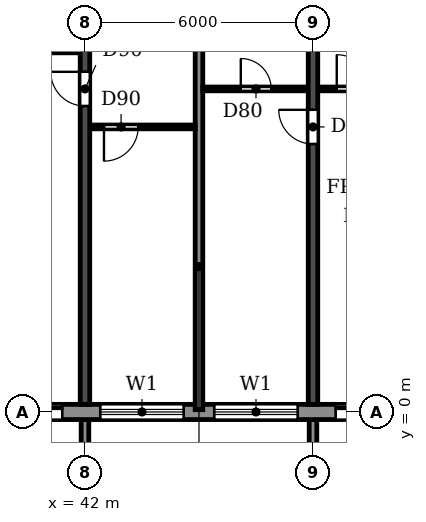
"""IFC4 building model, lengths in metres.
Left out: names, types, materials, properties, quantities, classifications, styles, units other than length and angle.
Written with IfcOpenShell. Run it as: python <this file> out.ifc"""

import sys

from ifc_helpers import new_model, si_unit, direction, frame, frame_2d, origin, place, context, subcontext, project, spatial, polyline, rectangle, outline, extrude, source, transform, mapped, element, fill, save


model = new_model("IFC4")
c1 = context("Model", 3, precision=1e-05, world=origin(), true_north=direction((0.0, 1.0)))
c2 = subcontext(c1, "Body", "Model", "MODEL_VIEW")
j1 = project(units=[si_unit("LENGTHUNIT", "METRE"), si_unit("PLANEANGLEUNIT", "RADIAN")], contexts=[c1])
p1 = place(None, origin())
s1 = spatial("IfcSite", under=j1, at=p1, CompositionType="ELEMENT")
p2 = place(p1, origin())
s2 = spatial("IfcBuilding", under=s1, at=p2, CompositionType="ELEMENT")
p3 = place(p2, frame((0.0, 0.0, 171.9)))
s3 = spatial("IfcBuildingStorey", under=s2, at=p3, CompositionType="ELEMENT", Elevation=171.9)
p4 = place(p3, frame((42.0, 0.2, 0.0), z_axis=(0.0, 0.0, 1.0), x_axis=(0.0, 1.0, 0.0)))
e1 = element("IfcWall", 1, at=p4, inside=s3, PredefinedType="SHEAR", context=c2, shape_type="SweptSolid", body=[
    extrude(rectangle(XDim=11.7, YDim=0.25, at=frame_2d((5.85, 0.0))), origin(), (0.0, 0.0, 1.0), 3.08),
])
p5 = place(p4, frame((7.85, 0.0, 0.0)))
e2 = element("IfcOpeningElement", 2, at=p5, cuts=e1, PredefinedType="OPENING", context=c2, shape_type="SweptSolid", body=[
    extrude(rectangle(XDim=0.9, YDim=2.1, at=frame_2d((0.45, 1.05))), frame((0.0, 0.135, 0.0), z_axis=(0.0, -1.0, 0.0), x_axis=(1.0, 0.0, 0.0)), (0.0, 0.0, 1.0), 0.27),
])
p6 = place(p3, frame((48.0, 0.2, 0.0), z_axis=(0.0, 0.0, 1.0), x_axis=(0.0, 1.0, 0.0)))
e3 = element("IfcWall", 3, at=p6, inside=s3, PredefinedType="SHEAR", context=c2, shape_type="SweptSolid", body=[
    extrude(rectangle(XDim=11.7, YDim=0.25, at=frame_2d((5.85, 0.0))), origin(), (0.0, 0.0, 1.0), 3.08),
])
p7 = place(p6, frame((6.85, 0.0, 0.0)))
e4 = element("IfcOpeningElement", 4, at=p7, cuts=e3, PredefinedType="OPENING", context=c2, shape_type="SweptSolid", body=[
    extrude(rectangle(XDim=0.9, YDim=2.1, at=frame_2d((0.45, 1.05))), frame((0.0, 0.135, 0.0), z_axis=(0.0, -1.0, 0.0), x_axis=(1.0, 0.0, 0.0)), (0.0, 0.0, 1.0), 0.27),
])
p8 = place(p3, frame((22.683, 0.0, 0.0), z_axis=(0.0, 0.0, 1.0), x_axis=(1.0, 0.0, 0.0)))
e5 = element("IfcWall", 5, at=p8, inside=s3, PredefinedType="STANDARD", context=c2, shape_type="SweptSolid", body=[
    extrude(rectangle(XDim=56.634, YDim=0.4, at=frame_2d((28.317, 0.0))), origin(), (0.0, 0.0, 1.0), 3.08),
])
p9 = place(p8, frame((1.717, 0.0, 0.9)))
e6 = element("IfcOpeningElement", 6, at=p9, cuts=e5, PredefinedType="OPENING", context=c2, shape_type="SweptSolid", body=[
    extrude(rectangle(XDim=2.2, YDim=1.5, at=frame_2d((1.1, 0.75))), frame((0.0, 0.21, 0.0), z_axis=(0.0, -1.0, 0.0), x_axis=(1.0, 0.0, 0.0)), (0.0, 0.0, 1.0), 0.42),
])
p10 = place(p8, frame((4.917, 0.0, 0.0)))
e7 = element("IfcOpeningElement", 7, at=p10, cuts=e5, PredefinedType="OPENING", context=c2, shape_type="SweptSolid", body=[
    extrude(rectangle(XDim=1.8, YDim=2.4, at=frame_2d((0.9, 1.2))), frame((0.0, 0.21, 0.0), z_axis=(0.0, -1.0, 0.0), x_axis=(1.0, 0.0, 0.0)), (0.0, 0.0, 1.0), 0.42),
])
p11 = place(p8, frame((7.717, 0.0, 0.9)))
e8 = element("IfcOpeningElement", 8, at=p11, cuts=e5, PredefinedType="OPENING", context=c2, shape_type="SweptSolid", body=[
    extrude(rectangle(XDim=2.2, YDim=1.5, at=frame_2d((1.1, 0.75))), frame((0.0, 0.21, 0.0), z_axis=(0.0, -1.0, 0.0), x_axis=(1.0, 0.0, 0.0)), (0.0, 0.0, 1.0), 0.42),
])
p12 = place(p8, frame((10.717, 0.0, 0.9)))
e9 = element("IfcOpeningElement", 9, at=p12, cuts=e5, PredefinedType="OPENING", context=c2, shape_type="SweptSolid", body=[
    extrude(rectangle(XDim=2.2, YDim=1.5, at=frame_2d((1.1, 0.75))), frame((0.0, 0.21, 0.0), z_axis=(0.0, -1.0, 0.0), x_axis=(1.0, 0.0, 0.0)), (0.0, 0.0, 1.0), 0.42),
])
p13 = place(p8, frame((13.717, 0.0, 0.9)))
e10 = element("IfcOpeningElement", 10, at=p13, cuts=e5, PredefinedType="OPENING", context=c2, shape_type="SweptSolid", body=[
    extrude(rectangle(XDim=2.2, YDim=1.5, at=frame_2d((1.1, 0.75))), frame((0.0, 0.21, 0.0), z_axis=(0.0, -1.0, 0.0), x_axis=(1.0, 0.0, 0.0)), (0.0, 0.0, 1.0), 0.42),
])
p14 = place(p8, frame((16.917, 0.0, 0.0)))
e11 = element("IfcOpeningElement", 11, at=p14, cuts=e5, PredefinedType="OPENING", context=c2, shape_type="SweptSolid", body=[
    extrude(rectangle(XDim=1.8, YDim=2.4, at=frame_2d((0.9, 1.2))), frame((0.0, 0.21, 0.0), z_axis=(0.0, -1.0, 0.0), x_axis=(1.0, 0.0, 0.0)), (0.0, 0.0, 1.0), 0.42),
])
p15 = place(p8, frame((19.717, 0.0, 0.9)))
e12 = element("IfcOpeningElement", 12, at=p15, cuts=e5, PredefinedType="OPENING", context=c2, shape_type="SweptSolid", body=[
    extrude(rectangle(XDim=2.2, YDim=1.5, at=frame_2d((1.1, 0.75))), frame((0.0, 0.21, 0.0), z_axis=(0.0, -1.0, 0.0), x_axis=(1.0, 0.0, 0.0)), (0.0, 0.0, 1.0), 0.42),
])
p16 = place(p8, frame((22.717, 0.0, 0.9)))
e13 = element("IfcOpeningElement", 13, at=p16, cuts=e5, PredefinedType="OPENING", context=c2, shape_type="SweptSolid", body=[
    extrude(rectangle(XDim=2.2, YDim=1.5, at=frame_2d((1.1, 0.75))), frame((0.0, 0.21, 0.0), z_axis=(0.0, -1.0, 0.0), x_axis=(1.0, 0.0, 0.0)), (0.0, 0.0, 1.0), 0.42),
])
p17 = place(p8, frame((25.917, 0.0, 0.0)))
e14 = element("IfcOpeningElement", 14, at=p17, cuts=e5, PredefinedType="OPENING", context=c2, shape_type="SweptSolid", body=[
    extrude(rectangle(XDim=1.8, YDim=2.4, at=frame_2d((0.9, 1.2))), frame((0.0, 0.21, 0.0), z_axis=(0.0, -1.0, 0.0), x_axis=(1.0, 0.0, 0.0)), (0.0, 0.0, 1.0), 0.42),
])
p18 = place(p8, frame((28.717, 0.0, 0.9)))
e15 = element("IfcOpeningElement", 15, at=p18, cuts=e5, PredefinedType="OPENING", context=c2, shape_type="SweptSolid", body=[
    extrude(rectangle(XDim=2.2, YDim=1.5, at=frame_2d((1.1, 0.75))), frame((0.0, 0.21, 0.0), z_axis=(0.0, -1.0, 0.0), x_axis=(1.0, 0.0, 0.0)), (0.0, 0.0, 1.0), 0.42),
])
p19 = place(p8, frame((31.717, 0.0, 0.9)))
e16 = element("IfcOpeningElement", 16, at=p19, cuts=e5, PredefinedType="OPENING", context=c2, shape_type="SweptSolid", body=[
    extrude(rectangle(XDim=2.2, YDim=1.5, at=frame_2d((1.1, 0.75))), frame((0.0, 0.21, 0.0), z_axis=(0.0, -1.0, 0.0), x_axis=(1.0, 0.0, 0.0)), (0.0, 0.0, 1.0), 0.42),
])
p20 = place(p8, frame((34.717, 0.0, 0.9)))
e17 = element("IfcOpeningElement", 17, at=p20, cuts=e5, PredefinedType="OPENING", context=c2, shape_type="SweptSolid", body=[
    extrude(rectangle(XDim=2.2, YDim=1.5, at=frame_2d((1.1, 0.75))), frame((0.0, 0.21, 0.0), z_axis=(0.0, -1.0, 0.0), x_axis=(1.0, 0.0, 0.0)), (0.0, 0.0, 1.0), 0.42),
])
p21 = place(p8, frame((37.717, 0.0, 0.9)))
e18 = element("IfcOpeningElement", 18, at=p21, cuts=e5, PredefinedType="OPENING", context=c2, shape_type="SweptSolid", body=[
    extrude(rectangle(XDim=2.2, YDim=1.5, at=frame_2d((1.1, 0.75))), frame((0.0, 0.21, 0.0), z_axis=(0.0, -1.0, 0.0), x_axis=(1.0, 0.0, 0.0)), (0.0, 0.0, 1.0), 0.42),
])
p22 = place(p8, frame((40.917, 0.0, 0.0)))
e19 = element("IfcOpeningElement", 19, at=p22, cuts=e5, PredefinedType="OPENING", context=c2, shape_type="SweptSolid", body=[
    extrude(rectangle(XDim=1.8, YDim=2.4, at=frame_2d((0.9, 1.2))), frame((0.0, 0.21, 0.0), z_axis=(0.0, -1.0, 0.0), x_axis=(1.0, 0.0, 0.0)), (0.0, 0.0, 1.0), 0.42),
])
p23 = place(p8, frame((43.717, 0.0, 0.9)))
e20 = element("IfcOpeningElement", 20, at=p23, cuts=e5, PredefinedType="OPENING", context=c2, shape_type="SweptSolid", body=[
    extrude(rectangle(XDim=2.2, YDim=1.5, at=frame_2d((1.1, 0.75))), frame((0.0, 0.21, 0.0), z_axis=(0.0, -1.0, 0.0), x_axis=(1.0, 0.0, 0.0)), (0.0, 0.0, 1.0), 0.42),
])
p24 = place(p8, frame((46.717, 0.0, 0.9)))
e21 = element("IfcOpeningElement", 21, at=p24, cuts=e5, PredefinedType="OPENING", context=c2, shape_type="SweptSolid", body=[
    extrude(rectangle(XDim=2.2, YDim=1.5, at=frame_2d((1.1, 0.75))), frame((0.0, 0.21, 0.0), z_axis=(0.0, -1.0, 0.0), x_axis=(1.0, 0.0, 0.0)), (0.0, 0.0, 1.0), 0.42),
])
p25 = place(p8, frame((49.717, 0.0, 0.9)))
e22 = element("IfcOpeningElement", 22, at=p25, cuts=e5, PredefinedType="OPENING", context=c2, shape_type="SweptSolid", body=[
    extrude(rectangle(XDim=2.2, YDim=1.5, at=frame_2d((1.1, 0.75))), frame((0.0, 0.21, 0.0), z_axis=(0.0, -1.0, 0.0), x_axis=(1.0, 0.0, 0.0)), (0.0, 0.0, 1.0), 0.42),
])
p26 = place(p8, frame((52.917, 0.0, 0.0)))
e23 = element("IfcOpeningElement", 23, at=p26, cuts=e5, PredefinedType="OPENING", context=c2, shape_type="SweptSolid", body=[
    extrude(rectangle(XDim=1.8, YDim=2.4, at=frame_2d((0.9, 1.2))), frame((0.0, 0.21, 0.0), z_axis=(0.0, -1.0, 0.0), x_axis=(1.0, 0.0, 0.0)), (0.0, 0.0, 1.0), 0.42),
])
m1 = source(origin(), c2, "Body", "SweptSolid", [
    extrude(outline(polyline([(0.0, 0.0), (0.2, 0.0), (0.2, 1.65), (0.0, 1.65), (0.0, 0.0)])), origin(), (0.0, 0.0, 1.0), 3.1),
])
for number, where in (
    (24, (41.9, -1.85, 0.0)),
    (25, (47.9, -1.85, 0.0)),
):
    element("IfcWall", number, at=place(p3, frame(where)), inside=s3, PredefinedType="STANDARD", context=c2, shape_type="MappedRepresentation", body=[
        mapped(m1, transform((0.0, 0.0, 0.0))),
    ])
p27 = place(p3, frame((45.0, 0.06, 0.0), z_axis=(0.0, 0.0, 1.0), x_axis=(0.0, 1.0, 0.0)))
e26 = element("IfcWall", 26, at=p27, inside=s3, PredefinedType="PARTITIONING", context=c2, shape_type="SweptSolid", body=[
    extrude(rectangle(XDim=11.83, YDim=0.2, at=frame_2d((5.915, 0.0))), origin(), (0.0, 0.0, 1.0), 3.08),
])
p28 = place(p3, frame((42.135, 7.5, 0.0), z_axis=(0.0, 0.0, 1.0), x_axis=(1.0, 0.0, 0.0)))
e27 = element("IfcWall", 27, at=p28, inside=s3, PredefinedType="PARTITIONING", context=c2, shape_type="SweptSolid", body=[
    extrude(rectangle(XDim=2.765, YDim=0.1, at=frame_2d((1.382, 0.0))), origin(), (0.0, 0.0, 1.0), 3.08),
])
p29 = place(p28, frame((0.365, 0.0, 0.0)))
e28 = element("IfcOpeningElement", 28, at=p29, cuts=e27, PredefinedType="OPENING", context=c2, shape_type="SweptSolid", body=[
    extrude(rectangle(XDim=0.9, YDim=2.1, at=frame_2d((0.45, 1.05))), frame((0.0, 0.06, 0.0), z_axis=(0.0, -1.0, 0.0), x_axis=(1.0, 0.0, 0.0)), (0.0, 0.0, 1.0), 0.12),
])
p30 = place(p3, frame((45.1, 8.5, 0.0), z_axis=(0.0, 0.0, 1.0), x_axis=(1.0, 0.0, 0.0)))
e29 = element("IfcWall", 29, at=p30, inside=s3, PredefinedType="PARTITIONING", context=c2, shape_type="SweptSolid", body=[
    extrude(rectangle(XDim=2.765, YDim=0.1, at=frame_2d((1.382, 0.0))), origin(), (0.0, 0.0, 1.0), 3.08),
])
p31 = place(p30, frame((1.0, 0.0, 0.0)))
e30 = element("IfcOpeningElement", 30, at=p31, cuts=e29, PredefinedType="OPENING", context=c2, shape_type="SweptSolid", body=[
    extrude(rectangle(XDim=0.8, YDim=2.1, at=frame_2d((0.4, 1.05))), frame((0.0, 0.06, 0.0), z_axis=(0.0, -1.0, 0.0), x_axis=(1.0, 0.0, 0.0)), (0.0, 0.0, 1.0), 0.12),
])
p32 = place(p3, frame((48.135, 8.5, 0.0), z_axis=(0.0, 0.0, 1.0), x_axis=(1.0, 0.0, 0.0)))
e31 = element("IfcWall", 31, at=p32, inside=s3, PredefinedType="PARTITIONING", context=c2, shape_type="SweptSolid", body=[
    extrude(rectangle(XDim=2.065, YDim=0.1, at=frame_2d((1.032, 0.0))), origin(), (0.0, 0.0, 1.0), 3.08),
])
p33 = place(p32, frame((0.49, 0.0, 0.0)))
e32 = element("IfcOpeningElement", 32, at=p33, cuts=e31, PredefinedType="OPENING", context=c2, shape_type="SweptSolid", body=[
    extrude(rectangle(XDim=0.9, YDim=2.1, at=frame_2d((0.45, 1.05))), frame((0.0, 0.06, 0.0), z_axis=(0.0, -1.0, 0.0), x_axis=(1.0, 0.0, 0.0)), (0.0, 0.0, 1.0), 0.12),
])
p34 = place(p14, origin())
e33 = element("IfcDoor", 33, at=p34, inside=s3, OperationType="DOUBLE_DOOR_SLIDING", PredefinedType="DOOR", context=c2, shape_type="SweptSolid", body=[
    extrude(rectangle(XDim=1.8, YDim=2.4, at=frame_2d((0.9, 1.2))), frame((0.0, 0.025, 0.0), z_axis=(0.0, -1.0, 0.0), x_axis=(1.0, 0.0, 0.0)), (0.0, 0.0, 1.0), 0.05),
])
fill(e11, e33)
p35 = place(p15, origin())
e34 = element("IfcWindow", 34, at=p35, inside=s3, PartitioningType="DOUBLE_PANEL_HORIZONTAL", PredefinedType="WINDOW", context=c2, shape_type="SweptSolid", body=[
    extrude(rectangle(XDim=2.2, YDim=1.5, at=frame_2d((1.1, 0.75))), frame((0.0, 0.03, 0.0), z_axis=(0.0, -1.0, 0.0), x_axis=(1.0, 0.0, 0.0)), (0.0, 0.0, 1.0), 0.06),
])
fill(e12, e34)
p36 = place(p16, origin())
e35 = element("IfcWindow", 35, at=p36, inside=s3, PartitioningType="DOUBLE_PANEL_HORIZONTAL", PredefinedType="WINDOW", context=c2, shape_type="SweptSolid", body=[
    extrude(rectangle(XDim=2.2, YDim=1.5, at=frame_2d((1.1, 0.75))), frame((0.0, 0.03, 0.0), z_axis=(0.0, -1.0, 0.0), x_axis=(1.0, 0.0, 0.0)), (0.0, 0.0, 1.0), 0.06),
])
fill(e13, e35)
p37 = place(p17, origin())
e36 = element("IfcDoor", 36, at=p37, inside=s3, OperationType="DOUBLE_DOOR_SLIDING", PredefinedType="DOOR", context=c2, shape_type="SweptSolid", body=[
    extrude(rectangle(XDim=1.8, YDim=2.4, at=frame_2d((0.9, 1.2))), frame((0.0, 0.025, 0.0), z_axis=(0.0, -1.0, 0.0), x_axis=(1.0, 0.0, 0.0)), (0.0, 0.0, 1.0), 0.05),
])
fill(e14, e36)
p38 = place(p29, frame((0.9, 0.0, 0.0), z_axis=(0.0, 0.0, 1.0), x_axis=(-1.0, 0.0, 0.0)))
e37 = element("IfcDoor", 37, at=p38, inside=s3, OperationType="SINGLE_SWING_RIGHT", PredefinedType="DOOR", context=c2, shape_type="SweptSolid", body=[
    extrude(rectangle(XDim=0.9, YDim=2.1, at=frame_2d((0.45, 1.05))), frame((0.0, 0.025, 0.0), z_axis=(0.0, -1.0, 0.0), x_axis=(1.0, 0.0, 0.0)), (0.0, 0.0, 1.0), 0.05),
])
fill(e28, e37)
p39 = place(p5, origin())
e38 = element("IfcDoor", 38, at=p39, inside=s3, OperationType="SINGLE_SWING_RIGHT", PredefinedType="DOOR", context=c2, shape_type="SweptSolid", body=[
    extrude(rectangle(XDim=0.9, YDim=2.1, at=frame_2d((0.45, 1.05))), frame((0.0, 0.025, 0.0), z_axis=(0.0, -1.0, 0.0), x_axis=(1.0, 0.0, 0.0)), (0.0, 0.0, 1.0), 0.05),
])
fill(e2, e38)
p40 = place(p31, origin())
e39 = element("IfcDoor", 39, at=p40, inside=s3, OperationType="SINGLE_SWING_LEFT", PredefinedType="DOOR", context=c2, shape_type="SweptSolid", body=[
    extrude(rectangle(XDim=0.8, YDim=2.1, at=frame_2d((0.4, 1.05))), frame((0.0, 0.025, 0.0), z_axis=(0.0, -1.0, 0.0), x_axis=(1.0, 0.0, 0.0)), (0.0, 0.0, 1.0), 0.05),
])
fill(e30, e39)
p41 = place(p7, origin())
e40 = element("IfcDoor", 40, at=p41, inside=s3, OperationType="SINGLE_SWING_RIGHT", PredefinedType="DOOR", context=c2, shape_type="SweptSolid", body=[
    extrude(rectangle(XDim=0.9, YDim=2.1, at=frame_2d((0.45, 1.05))), frame((0.0, 0.025, 0.0), z_axis=(0.0, -1.0, 0.0), x_axis=(1.0, 0.0, 0.0)), (0.0, 0.0, 1.0), 0.05),
])
fill(e4, e40)
p42 = place(p33, origin())
e41 = element("IfcDoor", 41, at=p42, inside=s3, OperationType="SINGLE_SWING_LEFT", PredefinedType="DOOR", context=c2, shape_type="SweptSolid", body=[
    extrude(rectangle(XDim=0.9, YDim=2.1, at=frame_2d((0.45, 1.05))), frame((0.0, 0.025, 0.0), z_axis=(0.0, -1.0, 0.0), x_axis=(1.0, 0.0, 0.0)), (0.0, 0.0, 1.0), 0.05),
])
fill(e32, e41)
save(model, sys.argv[1])
